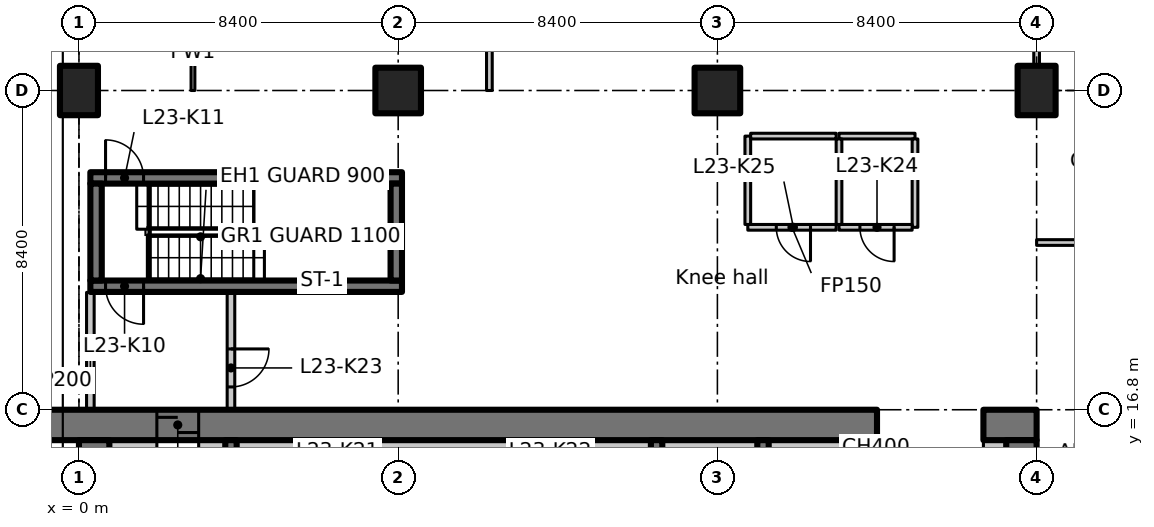
"""IFC4 building model, lengths in metres.
Left out: names, types, materials, properties, quantities, classifications, styles, units other than length and angle.
Written with IfcOpenShell. Run it as: python <this file> out.ifc"""

import sys

from ifc_helpers import new_model, si_unit, direction, frame, frame_2d, origin, origin_2d, place, context, subcontext, project, spatial, polyline, rectangle, outline, extrude, element, fill, save


model = new_model("IFC4")
c1 = context("Model", 3, precision=1e-05, world=origin(), true_north=direction((0.0, 1.0)))
c2 = subcontext(c1, "Body", "Model", "MODEL_VIEW")
j1 = project(units=[si_unit("LENGTHUNIT", "METRE"), si_unit("PLANEANGLEUNIT", "RADIAN")], contexts=[c1])
p1 = place(None, origin())
s1 = spatial("IfcSite", under=j1, at=p1, CompositionType="ELEMENT")
p2 = place(p1, origin())
s2 = spatial("IfcBuilding", under=s1, at=p2, CompositionType="ELEMENT")
p3 = place(p2, frame((0.0, 0.0, 98.9)))
s3 = spatial("IfcBuildingStorey", under=s2, at=p3, CompositionType="ELEMENT", Elevation=98.9)
p4 = place(p3, frame((0.0, 25.2, 0.0), z_axis=(0.0, 0.0, 1.0), x_axis=(1.0, 0.0, 0.0)))
e1 = element("IfcColumn", 1, at=p4, inside=s3, PredefinedType="COLUMN", context=c2, shape_type="SweptSolid", body=[
    extrude(rectangle(XDim=1.0, YDim=1.3, at=origin_2d()), origin(), (0.0, 0.0, 1.0), 3.35),
])
for number, where, z_axis, x_axis in (
    (2, (8.4, 25.2, 0.0), (0.0, 0.0, 1.0), (1.0, 0.0, 0.0)),
    (3, (16.8, 25.2, 0.0), (0.0, 0.0, 1.0), (1.0, 0.0, 0.0)),
):
    element("IfcColumn", number, at=place(p3, frame(where, z_axis=z_axis, x_axis=x_axis)), inside=s3, PredefinedType="COLUMN", context=c2, shape_type="SweptSolid", body=[
        extrude(rectangle(XDim=1.2, YDim=1.2, at=origin_2d()), origin(), (0.0, 0.0, 1.0), 3.35),
    ])
p5 = place(p3, frame((25.2, 25.2, 0.0), z_axis=(0.0, 0.0, 1.0), x_axis=(1.0, 0.0, 0.0)))
e4 = element("IfcColumn", 4, at=p5, inside=s3, PredefinedType="COLUMN", context=c2, shape_type="SweptSolid", body=[
    extrude(rectangle(XDim=1.0, YDim=1.3, at=origin_2d()), origin(), (0.0, 0.0, 1.0), 3.35),
])
p6 = place(p3, frame((-1.1, 16.4, 0.0), z_axis=(0.0, 0.0, 1.0), x_axis=(1.0, 0.0, 0.0)))
e5 = element("IfcWall", 5, at=p6, inside=s3, PredefinedType="SHEAR", context=c2, shape_type="SweptSolid", body=[
    extrude(rectangle(XDim=22.1, YDim=0.8, at=frame_2d((11.05, 0.0))), origin(), (0.0, 0.0, 1.0), 3.35),
])
p7 = place(p6, frame((3.15, 0.0, 0.0)))
e6 = element("IfcOpeningElement", 6, at=p7, cuts=e5, PredefinedType="OPENING", context=c2, shape_type="SweptSolid", body=[
    extrude(rectangle(XDim=1.1, YDim=2.3, at=frame_2d((0.55, 1.15))), frame((0.0, 0.41, 0.0), z_axis=(0.0, -1.0, 0.0), x_axis=(1.0, 0.0, 0.0)), (0.0, 0.0, 1.0), 0.82),
])
p8 = place(p3, frame((23.8, 16.4, 0.0), z_axis=(0.0, 0.0, 1.0), x_axis=(1.0, 0.0, 0.0)))
e7 = element("IfcWall", 7, at=p8, inside=s3, PredefinedType="SHEAR", context=c2, shape_type="SweptSolid", body=[
    extrude(rectangle(XDim=1.4, YDim=0.8, at=frame_2d((0.7, 0.0))), origin(), (0.0, 0.0, 1.0), 3.35),
])
p9 = place(p3, frame((0.4, 7.136, 0.0), z_axis=(0.0, 0.0, 1.0), x_axis=(0.0, 1.0, 0.0)))
e8 = element("IfcWall", 8, at=p9, inside=s3, PredefinedType="SHEAR", context=c2, shape_type="SweptSolid", body=[
    extrude(rectangle(XDim=8.864, YDim=0.8, at=frame_2d((4.432, 0.0))), origin(), (0.0, 0.0, 1.0), 3.35),
])
p10 = place(p3, frame((24.8, 12.6, 0.0), z_axis=(0.0, 0.0, 1.0), x_axis=(0.0, 1.0, 0.0)))
e9 = element("IfcWall", 9, at=p10, inside=s3, PredefinedType="SHEAR", context=c2, shape_type="SweptSolid", body=[
    extrude(rectangle(XDim=3.4, YDim=0.8, at=frame_2d((1.7, 0.0))), origin(), (0.0, 0.0, 1.0), 3.35),
])
p11 = place(p3, frame((0.8, 15.8, 0.0), z_axis=(0.0, 0.0, 1.0), x_axis=(1.0, 0.0, 0.0)))
e10 = element("IfcWall", 10, at=p11, inside=s3, PredefinedType="PARTITIONING", context=c2, shape_type="SweptSolid", body=[
    extrude(rectangle(XDim=1.25, YDim=0.4, at=frame_2d((0.625, 0.0))), origin(), (0.0, 0.0, 1.0), 3.35),
])
p12 = place(p3, frame((23.8, 15.8, 0.0), z_axis=(0.0, 0.0, 1.0), x_axis=(1.0, 0.0, 0.0)))
e11 = element("IfcWall", 11, at=p12, inside=s3, PredefinedType="PARTITIONING", context=c2, shape_type="SweptSolid", body=[
    extrude(rectangle(XDim=0.6, YDim=0.4, at=frame_2d((0.3, 0.0))), origin(), (0.0, 0.0, 1.0), 3.35),
])
for number, where, z_axis, x_axis in (
    (12, (4.0, 12.95, 0.0), (0.0, 0.0, 1.0), (0.0, 1.0, 0.0)),
    (13, (15.2, 12.95, 0.0), (0.0, 0.0, 1.0), (0.0, 1.0, 0.0)),
    (14, (18.0, 12.95, 0.0), (0.0, 0.0, 1.0), (0.0, 1.0, 0.0)),
    (15, (20.8, 12.95, 0.0), (0.0, 0.0, 1.0), (0.0, 1.0, 0.0)),
):
    element("IfcWall", number, at=place(p3, frame(where, z_axis=z_axis, x_axis=x_axis)), inside=s3, PredefinedType="SHEAR", context=c2, shape_type="SweptSolid", body=[
        extrude(rectangle(XDim=3.05, YDim=0.3, at=frame_2d((1.525, 0.0))), origin(), (0.0, 0.0, 1.0), 3.35),
    ])
p13 = place(p3, frame((8.5, 20.05, 0.0), z_axis=(0.0, 0.0, 1.0), x_axis=(-1.0, 0.0, 0.0)))
e16 = element("IfcWall", 16, at=p13, inside=s3, PredefinedType="SHEAR", context=c2, shape_type="SweptSolid", body=[
    extrude(rectangle(XDim=8.2, YDim=0.3, at=frame_2d((4.1, 0.0))), origin(), (0.0, 0.0, 1.0), 3.35),
])
p14 = place(p13, frame((6.8, 0.0, 0.0)))
e17 = element("IfcOpeningElement", 17, at=p14, cuts=e16, PredefinedType="OPENING", context=c2, shape_type="SweptSolid", body=[
    extrude(rectangle(XDim=1.0, YDim=2.1, at=frame_2d((0.5, 1.05))), frame((0.0, 0.16, 0.0), z_axis=(0.0, -1.0, 0.0), x_axis=(1.0, 0.0, 0.0)), (0.0, 0.0, 1.0), 0.32),
])
p15 = place(p3, frame((0.3, 22.9, 0.0), z_axis=(0.0, 0.0, 1.0), x_axis=(1.0, 0.0, 0.0)))
e18 = element("IfcWall", 18, at=p15, inside=s3, PredefinedType="SHEAR", context=c2, shape_type="SweptSolid", body=[
    extrude(rectangle(XDim=8.2, YDim=0.3, at=frame_2d((4.1, 0.0))), origin(), (0.0, 0.0, 1.0), 3.35),
])
p16 = place(p15, frame((0.4, 0.0, 0.0)))
e19 = element("IfcOpeningElement", 19, at=p16, cuts=e18, PredefinedType="OPENING", context=c2, shape_type="SweptSolid", body=[
    extrude(rectangle(XDim=1.0, YDim=2.1, at=frame_2d((0.5, 1.05))), frame((0.0, 0.16, 0.0), z_axis=(0.0, -1.0, 0.0), x_axis=(1.0, 0.0, 0.0)), (0.0, 0.0, 1.0), 0.32),
])
for number, where, z_axis, x_axis in (
    (20, (0.45, 20.2, 0.0), (0.0, 0.0, 1.0), (0.0, 1.0, 0.0)),
    (21, (8.35, 20.2, 0.0), (0.0, 0.0, 1.0), (0.0, 1.0, 0.0)),
):
    element("IfcWall", number, at=place(p3, frame(where, z_axis=z_axis, x_axis=x_axis)), inside=s3, PredefinedType="SHEAR", context=c2, shape_type="SweptSolid", body=[
        extrude(rectangle(XDim=2.55, YDim=0.3, at=frame_2d((1.275, 0.0))), origin(), (0.0, 0.0, 1.0), 3.35),
    ])
p17 = place(p3, frame((0.3, 16.812, 0.0), z_axis=(0.0, 0.0, 1.0), x_axis=(0.0, 1.0, 0.0)))
e22 = element("IfcWall", 22, at=p17, inside=s3, PredefinedType="PARTITIONING", context=c2, shape_type="SweptSolid", body=[
    extrude(rectangle(XDim=3.076, YDim=0.2, at=frame_2d((1.538, 0.0))), origin(), (0.0, 0.0, 1.0), 2.98),
])
p18 = place(p3, frame((4.0, 19.888, 0.0), z_axis=(0.0, 0.0, 1.0), x_axis=(0.0, -1.0, 0.0)))
e23 = element("IfcWall", 23, at=p18, inside=s3, PredefinedType="PARTITIONING", context=c2, shape_type="SweptSolid", body=[
    extrude(rectangle(XDim=3.076, YDim=0.2, at=frame_2d((1.538, 0.0))), origin(), (0.0, 0.0, 1.0), 3.35),
])
p19 = place(p18, frame((1.488, 0.0, 0.0)))
e24 = element("IfcOpeningElement", 24, at=p19, cuts=e23, PredefinedType="OPENING", context=c2, shape_type="SweptSolid", body=[
    extrude(rectangle(XDim=1.0, YDim=2.1, at=frame_2d((0.5, 1.05))), frame((0.0, 0.11, 0.0), z_axis=(0.0, -1.0, 0.0), x_axis=(1.0, 0.0, 0.0)), (0.0, 0.0, 1.0), 0.22),
])
p20 = place(p3, frame((20.0, 24.0, 0.0), z_axis=(0.0, 0.0, 1.0), x_axis=(1.0, 0.0, 0.0)))
e25 = element("IfcWall", 25, at=p20, inside=s3, PredefinedType="PARTITIONING", context=c2, shape_type="SweptSolid", body=[
    extrude(rectangle(XDim=2.0, YDim=0.15, at=frame_2d((1.0, 0.0))), origin(), (0.0, 0.0, 1.0), 3.35),
])
p21 = place(p3, frame((22.0, 23.925, 0.0), z_axis=(0.0, 0.0, 1.0), x_axis=(0.0, -1.0, 0.0)))
e26 = element("IfcWall", 26, at=p21, inside=s3, PredefinedType="PARTITIONING", context=c2, shape_type="SweptSolid", body=[
    extrude(rectangle(XDim=2.325, YDim=0.15, at=frame_2d((1.163, 0.0))), origin(), (0.0, 0.0, 1.0), 3.35),
])
p22 = place(p3, frame((21.925, 21.6, 0.0), z_axis=(0.0, 0.0, 1.0), x_axis=(-1.0, 0.0, 0.0)))
e27 = element("IfcWall", 27, at=p22, inside=s3, PredefinedType="PARTITIONING", context=c2, shape_type="SweptSolid", body=[
    extrude(rectangle(XDim=1.925, YDim=0.15, at=frame_2d((0.962, 0.0))), origin(), (0.0, 0.0, 1.0), 3.35),
])
p23 = place(p22, frame((0.475, 0.0, 0.0)))
e28 = element("IfcOpeningElement", 28, at=p23, cuts=e27, PredefinedType="OPENING", context=c2, shape_type="SweptSolid", body=[
    extrude(rectangle(XDim=0.9, YDim=2.1, at=frame_2d((0.45, 1.05))), frame((0.0, 0.085, 0.0), z_axis=(0.0, -1.0, 0.0), x_axis=(1.0, 0.0, 0.0)), (0.0, 0.0, 1.0), 0.17),
])
p24 = place(p3, frame((20.0, 21.675, 0.0), z_axis=(0.0, 0.0, 1.0), x_axis=(0.0, 1.0, 0.0)))
e29 = element("IfcWall", 29, at=p24, inside=s3, PredefinedType="PARTITIONING", context=c2, shape_type="SweptSolid", body=[
    extrude(rectangle(XDim=2.25, YDim=0.15, at=frame_2d((1.125, 0.0))), origin(), (0.0, 0.0, 1.0), 3.35),
])
p25 = place(p3, frame((19.925, 21.6, 0.0), z_axis=(0.0, 0.0, 1.0), x_axis=(-1.0, 0.0, 0.0)))
e30 = element("IfcWall", 30, at=p25, inside=s3, PredefinedType="PARTITIONING", context=c2, shape_type="SweptSolid", body=[
    extrude(rectangle(XDim=2.325, YDim=0.15, at=frame_2d((1.163, 0.0))), origin(), (0.0, 0.0, 1.0), 3.35),
])
p26 = place(p25, frame((0.675, 0.0, 0.0)))
e31 = element("IfcOpeningElement", 31, at=p26, cuts=e30, PredefinedType="OPENING", context=c2, shape_type="SweptSolid", body=[
    extrude(rectangle(XDim=0.9, YDim=2.1, at=frame_2d((0.45, 1.05))), frame((0.0, 0.085, 0.0), z_axis=(0.0, -1.0, 0.0), x_axis=(1.0, 0.0, 0.0)), (0.0, 0.0, 1.0), 0.17),
])
p27 = place(p3, frame((17.6, 21.675, 0.0), z_axis=(0.0, 0.0, 1.0), x_axis=(0.0, 1.0, 0.0)))
e32 = element("IfcWall", 32, at=p27, inside=s3, PredefinedType="PARTITIONING", context=c2, shape_type="SweptSolid", body=[
    extrude(rectangle(XDim=2.325, YDim=0.15, at=frame_2d((1.163, 0.0))), origin(), (0.0, 0.0, 1.0), 3.35),
])
p28 = place(p3, frame((17.675, 24.0, 0.0), z_axis=(0.0, 0.0, 1.0), x_axis=(1.0, 0.0, 0.0)))
e33 = element("IfcWall", 33, at=p28, inside=s3, PredefinedType="PARTITIONING", context=c2, shape_type="SweptSolid", body=[
    extrude(rectangle(XDim=2.25, YDim=0.15, at=frame_2d((1.125, 0.0))), origin(), (0.0, 0.0, 1.0), 3.35),
])
p29 = place(p3, frame((3.15, 15.8, 0.0), z_axis=(0.0, 0.0, 1.0), x_axis=(1.0, 0.0, 0.0)))
e34 = element("IfcWall", 34, at=p29, inside=s3, PredefinedType="PARTITIONING", context=c2, shape_type="SweptSolid", body=[
    extrude(rectangle(XDim=0.7, YDim=0.4, at=frame_2d((0.35, 0.0))), origin(), (0.0, 0.0, 1.0), 3.35),
])
p30 = place(p3, frame((4.15, 15.8, 0.0), z_axis=(0.0, 0.0, 1.0), x_axis=(1.0, 0.0, 0.0)))
e35 = element("IfcWall", 35, at=p30, inside=s3, PredefinedType="PARTITIONING", context=c2, shape_type="SweptSolid", body=[
    extrude(rectangle(XDim=10.9, YDim=0.4, at=frame_2d((5.45, 0.0))), origin(), (0.0, 0.0, 1.0), 3.35),
])
for number, where, z_axis, x_axis in (
    (36, (15.35, 15.8, 0.0), (0.0, 0.0, 1.0), (1.0, 0.0, 0.0)),
    (37, (18.15, 15.8, 0.0), (0.0, 0.0, 1.0), (1.0, 0.0, 0.0)),
):
    element("IfcWall", number, at=place(p3, frame(where, z_axis=z_axis, x_axis=x_axis)), inside=s3, PredefinedType="PARTITIONING", context=c2, shape_type="SweptSolid", body=[
        extrude(rectangle(XDim=2.5, YDim=0.4, at=frame_2d((1.25, 0.0))), origin(), (0.0, 0.0, 1.0), 3.35),
    ])
p31 = place(p3, frame((20.95, 15.8, 0.0), z_axis=(0.0, 0.0, 1.0), x_axis=(1.0, 0.0, 0.0)))
e38 = element("IfcWall", 38, at=p31, inside=s3, PredefinedType="PARTITIONING", context=c2, shape_type="SweptSolid", body=[
    extrude(rectangle(XDim=0.05, YDim=0.4, at=frame_2d((0.025, 0.0))), origin(), (0.0, 0.0, 1.0), 3.35),
])
p32 = place(p3, frame((25.2, 21.2, 0.0), z_axis=(0.0, 0.0, 1.0), x_axis=(1.0, 0.0, 0.0)))
e39 = element("IfcWall", 39, at=p32, inside=s3, PredefinedType="PARTITIONING", context=c2, shape_type="SweptSolid", body=[
    extrude(rectangle(XDim=4.2, YDim=0.15, at=frame_2d((2.1, 0.0))), origin(), (0.0, 0.0, 1.0), 3.33),
])
p33 = place(p3, frame((25.2, 31.0, 0.0), z_axis=(0.0, 0.0, 1.0), x_axis=(0.0, -1.0, 0.0)))
e40 = element("IfcWall", 40, at=p33, inside=s3, PredefinedType="PARTITIONING", context=c2, shape_type="SweptSolid", body=[
    extrude(outline(polyline([(0.0, 0.0), (5.13, 0.0), (5.13, 2.98), (0.0, 2.98), (0.0, 0.0)])), frame((0.0, 0.075, 0.0), z_axis=(0.0, -1.0, 0.0), x_axis=(1.0, 0.0, 0.0)), (0.0, 0.0, 1.0), 0.15),
])
p34 = place(p33, frame((1.93, 0.0, 0.0)))
e41 = element("IfcOpeningElement", 41, at=p34, cuts=e40, PredefinedType="OPENING", context=c2, shape_type="SweptSolid", body=[
    extrude(rectangle(XDim=1.1, YDim=2.1, at=frame_2d((0.55, 1.05))), frame((0.0, 0.085, 0.0), z_axis=(0.0, -1.0, 0.0), x_axis=(1.0, 0.0, 0.0)), (0.0, 0.0, 1.0), 0.17),
])
p35 = place(p3, frame((10.8, 25.2, 0.0), z_axis=(0.0, 0.0, 1.0), x_axis=(0.0, 1.0, 0.0)))
e42 = element("IfcWall", 42, at=p35, inside=s3, PredefinedType="PARTITIONING", context=c2, shape_type="SweptSolid", body=[
    extrude(rectangle(XDim=4.2, YDim=0.15, at=frame_2d((2.1, 0.0))), origin(), (0.0, 0.0, 1.0), 3.33),
])
p36 = place(p3, frame((3.0, 29.4, 0.0), z_axis=(0.0, 0.0, 1.0), x_axis=(0.0, -1.0, 0.0)))
e43 = element("IfcWall", 43, at=p36, inside=s3, PredefinedType="PARTITIONING", context=c2, shape_type="SweptSolid", body=[
    extrude(rectangle(XDim=4.2, YDim=0.1, at=frame_2d((2.1, 0.0))), origin(), (0.0, 0.0, 1.0), 3.33),
])
p37 = place(p7, origin())
e44 = element("IfcDoor", 44, at=p37, inside=s3, OperationType="SLIDING_TO_LEFT", PredefinedType="DOOR", context=c2, shape_type="SweptSolid", body=[
    extrude(rectangle(XDim=1.1, YDim=2.3, at=frame_2d((0.55, 1.15))), frame((0.0, 0.025, 0.0), z_axis=(0.0, -1.0, 0.0), x_axis=(1.0, 0.0, 0.0)), (0.0, 0.0, 1.0), 0.05),
])
fill(e6, e44)
p38 = place(p14, origin())
e45 = element("IfcDoor", 45, at=p38, inside=s3, OperationType="SINGLE_SWING_RIGHT", PredefinedType="DOOR", context=c2, shape_type="SweptSolid", body=[
    extrude(rectangle(XDim=1.0, YDim=2.1, at=frame_2d((0.5, 1.05))), frame((0.0, 0.025, 0.0), z_axis=(0.0, -1.0, 0.0), x_axis=(1.0, 0.0, 0.0)), (0.0, 0.0, 1.0), 0.05),
])
fill(e17, e45)
p39 = place(p16, origin())
e46 = element("IfcDoor", 46, at=p39, inside=s3, OperationType="SINGLE_SWING_LEFT", PredefinedType="DOOR", context=c2, shape_type="SweptSolid", body=[
    extrude(rectangle(XDim=1.0, YDim=2.1, at=frame_2d((0.5, 1.05))), frame((0.0, 0.025, 0.0), z_axis=(0.0, -1.0, 0.0), x_axis=(1.0, 0.0, 0.0)), (0.0, 0.0, 1.0), 0.05),
])
fill(e19, e46)
p40 = place(p19, origin())
e47 = element("IfcDoor", 47, at=p40, inside=s3, OperationType="SINGLE_SWING_LEFT", PredefinedType="DOOR", context=c2, shape_type="SweptSolid", body=[
    extrude(rectangle(XDim=1.0, YDim=2.1, at=frame_2d((0.5, 1.05))), frame((0.0, 0.025, 0.0), z_axis=(0.0, -1.0, 0.0), x_axis=(1.0, 0.0, 0.0)), (0.0, 0.0, 1.0), 0.05),
])
fill(e24, e47)
p41 = place(p23, origin())
e48 = element("IfcDoor", 48, at=p41, inside=s3, OperationType="SINGLE_SWING_RIGHT", PredefinedType="DOOR", context=c2, shape_type="SweptSolid", body=[
    extrude(rectangle(XDim=0.9, YDim=2.1, at=frame_2d((0.45, 1.05))), frame((0.0, 0.025, 0.0), z_axis=(0.0, -1.0, 0.0), x_axis=(1.0, 0.0, 0.0)), (0.0, 0.0, 1.0), 0.05),
])
fill(e28, e48)
p42 = place(p26, origin())
e49 = element("IfcDoor", 49, at=p42, inside=s3, OperationType="SINGLE_SWING_LEFT", PredefinedType="DOOR", context=c2, shape_type="SweptSolid", body=[
    extrude(rectangle(XDim=0.9, YDim=2.1, at=frame_2d((0.45, 1.05))), frame((0.0, 0.025, 0.0), z_axis=(0.0, -1.0, 0.0), x_axis=(1.0, 0.0, 0.0)), (0.0, 0.0, 1.0), 0.05),
])
fill(e31, e49)
save(model, sys.argv[1])
